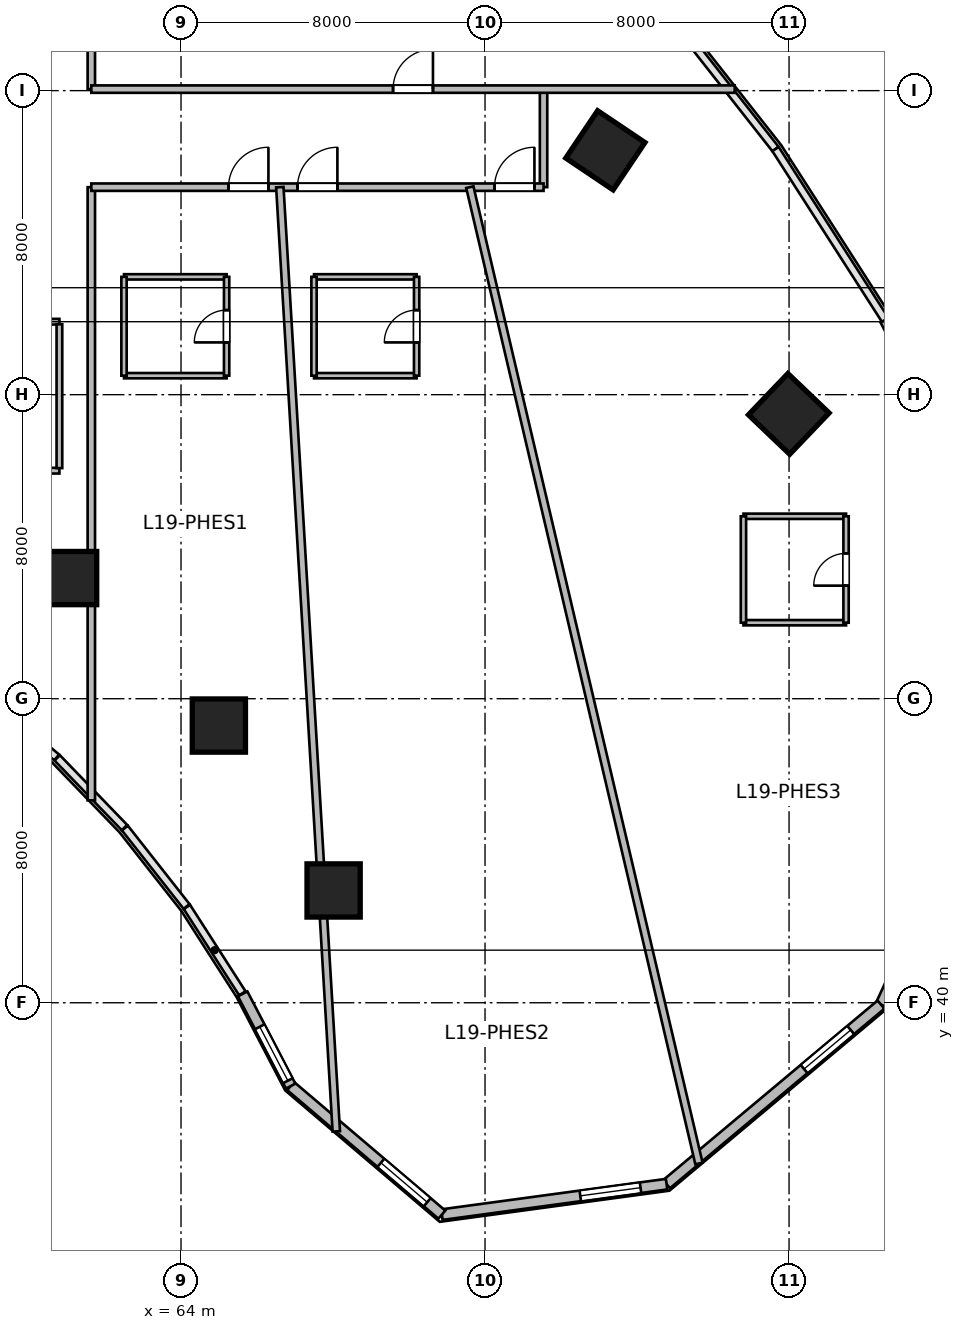
"""IFC4 building model, lengths in metres.
Left out: names, types, materials, properties, quantities, classifications, styles, units other than length and angle.
Written with IfcOpenShell. Run it as: python <this file> out.ifc"""

import sys

from ifc_helpers import new_model, si_unit, direction, frame, frame_2d, origin, origin_2d, place, context, subcontext, project, spatial, rectangle, circle, extrude, source, transform, mapped, element, fill, save


model = new_model("IFC4")
c1 = context("Model", 3, precision=1e-05, world=origin(), true_north=direction((0.0, 1.0)))
c2 = subcontext(c1, "Body", "Model", "MODEL_VIEW")
j1 = project(units=[si_unit("LENGTHUNIT", "METRE"), si_unit("PLANEANGLEUNIT", "RADIAN")], contexts=[c1])
p1 = place(None, origin())
s1 = spatial("IfcSite", under=j1, at=p1, CompositionType="ELEMENT")
p2 = place(p1, origin())
s2 = spatial("IfcBuilding", under=s1, at=p2, CompositionType="ELEMENT")
p3 = place(p2, frame((0.0, 0.0, 82.2)))
s3 = spatial("IfcBuildingStorey", under=s2, at=p3, CompositionType="ELEMENT", Elevation=82.2)
m1 = source(origin(), c2, "Body", "SweptSolid", [
    extrude(circle(Radius=0.7, at=origin_2d()), origin(), (0.0, 0.0, 1.0), 3.6),
])
for number, where, z_axis, x_axis in (
    (1, (61.082, 51.175, 0.0), (0.0, 0.0, 1.0), (0.409, 0.912, 0.0)),
    (2, (64.996, 47.294, 0.0), (0.0, 0.0, 1.0), (0.558, 0.83, 0.0)),
):
    element("IfcColumn", number, at=place(p3, frame(where, z_axis=z_axis, x_axis=x_axis)), inside=s3, PredefinedType="COLUMN", context=c2, shape_type="MappedRepresentation", body=[
        mapped(m1, transform((0.0, 0.0, 0.0), scale=1.0)),
    ])
m2 = source(origin(), c2, "Body", "SweptSolid", [
    extrude(rectangle(XDim=1.5, YDim=1.5, at=origin_2d()), origin(), (0.0, 0.0, 1.0), 3.6),
])
p4 = place(p3, frame((75.167, 62.43, 0.0), z_axis=(0.0, 0.0, 1.0), x_axis=(0.55774510898, 0.830012285095, 0.0)))
e3 = element("IfcColumn", 3, at=p4, inside=s3, PredefinedType="COLUMN", context=c2, shape_type="MappedRepresentation", body=[
    mapped(m2, transform((0.0, 0.0, 0.0), scale=1.0)),
])
p5 = place(p3, frame((68.015, 42.955, 0.0), z_axis=(0.0, 0.0, 1.0), x_axis=(0.690756218984, 0.723087716626, 0.0)))
e4 = element("IfcColumn", 4, at=p5, inside=s3, PredefinedType="COLUMN", context=c2, shape_type="MappedRepresentation", body=[
    mapped(m1, transform((0.0, 0.0, 0.0), scale=1.0)),
])
p6 = place(p3, frame((79.993, 55.494, 0.0), z_axis=(0.0, 0.0, 1.0), x_axis=(0.690756218984, 0.723087716626, 0.0)))
e5 = element("IfcColumn", 5, at=p6, inside=s3, PredefinedType="COLUMN", context=c2, shape_type="MappedRepresentation", body=[
    mapped(m2, transform((0.0, 0.0, 0.0), scale=1.0)),
])
m3 = source(origin(), c2, "Body", "SweptSolid", [
    extrude(rectangle(XDim=7.536, YDim=0.28, at=frame_2d((3.768, 0.0))), origin(), (0.0, 0.0, 1.0), 3.28),
])
p7 = place(p3, frame((85.582, 46.792, 0.0), z_axis=(0.0, 0.0, 1.0), x_axis=(-0.41964973873, -0.907686122393, 0.0)))
e6 = element("IfcWall", 6, at=p7, inside=s3, PredefinedType="SOLIDWALL", context=c2, shape_type="MappedRepresentation", body=[
    mapped(m3, transform((0.0, 0.0, 0.0), scale=1.0)),
])
p8 = place(p7, frame((4.852, 0.0, 0.95)))
e7 = element("IfcOpeningElement", 7, at=p8, cuts=e6, PredefinedType="OPENING", context=c2, shape_type="SweptSolid", body=[
    extrude(rectangle(XDim=1.6, YDim=1.9, at=frame_2d((0.8, 0.95))), frame((0.0, 0.15, 0.0), z_axis=(0.0, -1.0, 0.0), x_axis=(1.0, 0.0, 0.0)), (0.0, 0.0, 1.0), 0.3),
])
m4 = source(origin(), c2, "Body", "SweptSolid", [
    extrude(rectangle(XDim=7.359, YDim=0.28, at=frame_2d((3.679, 0.0))), origin(), (0.0, 0.0, 1.0), 3.28),
])
p9 = place(p3, frame((82.42, 39.951, 0.0), z_axis=(0.0, 0.0, 1.0), x_axis=(-0.766737165543, -0.641961150675, 0.0)))
e8 = element("IfcWall", 8, at=p9, inside=s3, PredefinedType="SOLIDWALL", context=c2, shape_type="MappedRepresentation", body=[
    mapped(m4, transform((0.0, 0.0, 0.0), scale=1.0)),
])
p10 = place(p9, frame((1.04, 0.0, 0.95)))
e9 = element("IfcOpeningElement", 9, at=p10, cuts=e8, PredefinedType="OPENING", context=c2, shape_type="SweptSolid", body=[
    extrude(rectangle(XDim=1.6, YDim=1.9, at=frame_2d((0.8, 0.95))), frame((0.0, 0.15, 0.0), z_axis=(0.0, -1.0, 0.0), x_axis=(1.0, 0.0, 0.0)), (0.0, 0.0, 1.0), 0.3),
])
m5 = source(origin(), c2, "Body", "SweptSolid", [
    extrude(rectangle(XDim=5.967, YDim=0.28, at=frame_2d((2.984, 0.0))), origin(), (0.0, 0.0, 1.0), 3.28),
])
p11 = place(p3, frame((76.777, 35.227, 0.0), z_axis=(0.0, 0.0, 1.0), x_axis=(-0.990927009341, -0.134401124099, 0.0)))
e10 = element("IfcWall", 10, at=p11, inside=s3, PredefinedType="SOLIDWALL", context=c2, shape_type="MappedRepresentation", body=[
    mapped(m5, transform((0.0, 0.0, 0.0), scale=1.0)),
])
p12 = place(p11, frame((0.692, 0.0, 0.95)))
e11 = element("IfcOpeningElement", 11, at=p12, cuts=e10, PredefinedType="OPENING", context=c2, shape_type="SweptSolid", body=[
    extrude(rectangle(XDim=1.6, YDim=1.9, at=frame_2d((0.8, 0.95))), frame((0.0, 0.15, 0.0), z_axis=(0.0, -1.0, 0.0), x_axis=(1.0, 0.0, 0.0)), (0.0, 0.0, 1.0), 0.3),
])
m6 = source(origin(), c2, "Body", "SweptSolid", [
    extrude(rectangle(XDim=5.222, YDim=0.28, at=frame_2d((2.611, 0.0))), origin(), (0.0, 0.0, 1.0), 3.28),
])
p13 = place(p3, frame((70.864, 34.425, 0.0), z_axis=(0.0, 0.0, 1.0), x_axis=(-0.761900099546, 0.647694556339, 0.0)))
e12 = element("IfcWall", 12, at=p13, inside=s3, PredefinedType="SOLIDWALL", context=c2, shape_type="MappedRepresentation", body=[
    mapped(m6, transform((0.0, 0.0, 0.0), scale=1.0)),
])
p14 = place(p13, frame((0.506, 0.0, 0.95)))
e13 = element("IfcOpeningElement", 13, at=p14, cuts=e12, PredefinedType="OPENING", context=c2, shape_type="SweptSolid", body=[
    extrude(rectangle(XDim=1.6, YDim=1.9, at=frame_2d((0.8, 0.95))), frame((0.0, 0.15, 0.0), z_axis=(0.0, -1.0, 0.0), x_axis=(1.0, 0.0, 0.0)), (0.0, 0.0, 1.0), 0.3),
])
m7 = source(origin(), c2, "Body", "SweptSolid", [
    extrude(rectangle(XDim=2.735, YDim=0.28, at=frame_2d((1.368, 0.0))), origin(), (0.0, 0.0, 1.0), 3.28),
])
p15 = place(p3, frame((66.885, 37.807, 0.0), z_axis=(0.0, 0.0, 1.0), x_axis=(-0.46179107292, 0.886988728774, 0.0)))
e14 = element("IfcWall", 14, at=p15, inside=s3, PredefinedType="SOLIDWALL", context=c2, shape_type="MappedRepresentation", body=[
    mapped(m7, transform((0.0, 0.0, 0.0), scale=1.0)),
])
p16 = place(p15, frame((0.16, 0.0, 0.95)))
e15 = element("IfcOpeningElement", 15, at=p16, cuts=e14, PredefinedType="OPENING", context=c2, shape_type="SweptSolid", body=[
    extrude(rectangle(XDim=1.6, YDim=1.9, at=frame_2d((0.8, 0.95))), frame((0.0, 0.15, 0.0), z_axis=(0.0, -1.0, 0.0), x_axis=(1.0, 0.0, 0.0)), (0.0, 0.0, 1.0), 0.3),
])
m8 = source(origin(), c2, "Body", "SweptSolid", [
    extrude(rectangle(XDim=5.459, YDim=0.28, at=frame_2d((2.73, 0.0))), origin(), (0.0, 0.0, 1.0), 3.28),
])
p17 = place(p3, frame((82.532, 57.965, 0.0), z_axis=(0.0, 0.0, 1.0), x_axis=(0.461768054321, -0.887000712518, 0.0)))
e16 = element("IfcWall", 16, at=p17, inside=s3, PredefinedType="SOLIDWALL", context=c2, shape_type="MappedRepresentation", body=[
    mapped(m8, transform((0.0, 0.0, 0.0), scale=1.0)),
])
p18 = place(p17, frame((3.295, 0.0, 0.95)))
e17 = element("IfcOpeningElement", 17, at=p18, cuts=e16, PredefinedType="OPENING", context=c2, shape_type="SweptSolid", body=[
    extrude(rectangle(XDim=1.6, YDim=1.9, at=frame_2d((0.8, 0.95))), frame((0.0, 0.15, 0.0), z_axis=(0.0, -1.0, 0.0), x_axis=(1.0, 0.0, 0.0)), (0.0, 0.0, 1.0), 0.3),
])
m9 = source(origin(), c2, "Body", "SweptSolid", [
    extrude(rectangle(XDim=2.58, YDim=0.195, at=frame_2d((1.29, 0.0))), origin(), (0.0, 0.0, 1.0), 2.847),
])
p19 = place(p3, frame((73.54, 61.46, 0.0), z_axis=(0.0, 0.0, 1.0), x_axis=(0.0, 1.0, 0.0)))
e18 = element("IfcWall", 18, at=p19, inside=s3, PredefinedType="PARTITIONING", context=c2, shape_type="MappedRepresentation", body=[
    mapped(m9, transform((0.0, 0.0, 0.0), scale=1.0)),
])
m10 = source(origin(), c2, "Body", "SweptSolid", [
    extrude(rectangle(XDim=6.6, YDim=0.15, at=frame_2d((3.3, 0.0))), origin(), (0.0, 0.0, 1.0), 2.723),
])
p20 = place(p3, frame((54.2, 54.0, 0.0), z_axis=(0.0, 0.0, 1.0), x_axis=(1.0, 0.0, 0.0)))
e19 = element("IfcWall", 19, at=p20, inside=s3, PredefinedType="PARTITIONING", context=c2, shape_type="MappedRepresentation", body=[
    mapped(m10, transform((0.0, 0.0, 0.0), scale=1.0)),
])
m11 = source(origin(), c2, "Body", "SweptSolid", [
    extrude(rectangle(XDim=6.6, YDim=0.15, at=frame_2d((3.3, 0.0))), origin(), (0.0, 0.0, 1.0), 3.28),
])
p21 = place(p3, frame((54.2, 57.92, 0.0), z_axis=(0.0, 0.0, 1.0), x_axis=(1.0, 0.0, 0.0)))
e20 = element("IfcWall", 20, at=p21, inside=s3, PredefinedType="PARTITIONING", context=c2, shape_type="MappedRepresentation", body=[
    mapped(m11, transform((0.0, 0.0, 0.0), scale=1.0)),
])
p22 = place(p21, frame((2.825, 0.0, 0.0)))
e21 = element("IfcOpeningElement", 21, at=p22, cuts=e20, PredefinedType="OPENING", context=c2, shape_type="SweptSolid", body=[
    extrude(rectangle(XDim=0.95, YDim=2.1, at=frame_2d((0.475, 1.05))), frame((0.0, 0.085, 0.0), z_axis=(0.0, -1.0, 0.0), x_axis=(1.0, 0.0, 0.0)), (0.0, 0.0, 1.0), 0.17),
])
m12 = source(origin(), c2, "Body", "SweptSolid", [
    extrude(rectangle(XDim=3.785, YDim=0.15, at=frame_2d((1.893, 0.0))), origin(), (0.0, 0.0, 1.0), 3.28),
])
p23 = place(p3, frame((60.8, 54.067, 0.0), z_axis=(0.0, 0.0, 1.0), x_axis=(0.0, 1.0, 0.0)))
e22 = element("IfcWall", 22, at=p23, inside=s3, PredefinedType="PARTITIONING", context=c2, shape_type="MappedRepresentation", body=[
    mapped(m12, transform((0.0, 0.0, 0.0), scale=1.0)),
])
m13 = source(origin(), c2, "Body", "SweptSolid", [
    extrude(rectangle(XDim=1.76, YDim=0.195, at=frame_2d((0.88, 0.0))), origin(), (0.0, 0.0, 1.0), 3.28),
])
p24 = place(p3, frame((61.64, 64.04, 0.0), z_axis=(0.0, 0.0, 1.0), x_axis=(0.0, 1.0, 0.0)))
e23 = element("IfcWall", 23, at=p24, inside=s3, PredefinedType="PARTITIONING", context=c2, shape_type="MappedRepresentation", body=[
    mapped(m13, transform((0.0, 0.0, 0.0), scale=1.0)),
])
m14 = source(origin(), c2, "Body", "SweptSolid", [
    extrude(rectangle(XDim=16.134, YDim=0.195, at=frame_2d((8.067, 0.0))), origin(), (0.0, 0.0, 1.0), 2.564),
])
p25 = place(p3, frame((61.64, 45.326, 0.0), z_axis=(0.0, 0.0, 1.0), x_axis=(0.0, 1.0, 0.0)))
e24 = element("IfcWall", 24, at=p25, inside=s3, PredefinedType="PARTITIONING", context=c2, shape_type="MappedRepresentation", body=[
    mapped(m14, transform((0.0, 0.0, 0.0), scale=1.0)),
])
m15 = source(origin(), c2, "Body", "SweptSolid", [
    extrude(rectangle(XDim=16.93, YDim=0.195, at=frame_2d((8.465, 0.0))), origin(), (0.0, 0.0, 1.0), 3.28),
])
p26 = place(p3, frame((61.64, 64.04, 0.0), z_axis=(0.0, 0.0, 1.0), x_axis=(1.0, 0.0, 0.0)))
e25 = element("IfcWall", 25, at=p26, inside=s3, PredefinedType="PARTITIONING", context=c2, shape_type="MappedRepresentation", body=[
    mapped(m15, transform((0.0, 0.0, 0.0), scale=1.0)),
])
p27 = place(p26, frame((7.94, 0.0, 0.0)))
e26 = element("IfcOpeningElement", 26, at=p27, cuts=e25, PredefinedType="OPENING", context=c2, shape_type="SweptSolid", body=[
    extrude(rectangle(XDim=1.05, YDim=2.15, at=frame_2d((0.525, 1.075))), frame((0.0, 0.107, 0.0), z_axis=(0.0, -1.0, 0.0), x_axis=(1.0, 0.0, 0.0)), (0.0, 0.0, 1.0), 0.215),
])
m16 = source(origin(), c2, "Body", "SweptSolid", [
    extrude(rectangle(XDim=11.9, YDim=0.195, at=frame_2d((5.95, 0.0))), origin(), (0.0, 0.0, 1.0), 3.28),
])
p28 = place(p3, frame((61.64, 61.46, 0.0), z_axis=(0.0, 0.0, 1.0), x_axis=(1.0, 0.0, 0.0)))
e27 = element("IfcWall", 27, at=p28, inside=s3, PredefinedType="PARTITIONING", context=c2, shape_type="MappedRepresentation", body=[
    mapped(m16, transform((0.0, 0.0, 0.0), scale=1.0)),
])
p29 = place(p28, frame((3.61, 0.0, 0.0)))
e28 = element("IfcOpeningElement", 28, at=p29, cuts=e27, PredefinedType="OPENING", context=c2, shape_type="SweptSolid", body=[
    extrude(rectangle(XDim=1.05, YDim=2.15, at=frame_2d((0.525, 1.075))), frame((0.0, 0.107, 0.0), z_axis=(0.0, -1.0, 0.0), x_axis=(1.0, 0.0, 0.0)), (0.0, 0.0, 1.0), 0.215),
])
p30 = place(p28, frame((5.425, 0.0, 0.0)))
e29 = element("IfcOpeningElement", 29, at=p30, cuts=e27, PredefinedType="OPENING", context=c2, shape_type="SweptSolid", body=[
    extrude(rectangle(XDim=1.05, YDim=2.15, at=frame_2d((0.525, 1.075))), frame((0.0, 0.107, 0.0), z_axis=(0.0, -1.0, 0.0), x_axis=(1.0, 0.0, 0.0)), (0.0, 0.0, 1.0), 0.215),
])
p31 = place(p28, frame((10.61, 0.0, 0.0)))
e30 = element("IfcOpeningElement", 30, at=p31, cuts=e27, PredefinedType="OPENING", context=c2, shape_type="SweptSolid", body=[
    extrude(rectangle(XDim=1.05, YDim=2.15, at=frame_2d((0.525, 1.075))), frame((0.0, 0.107, 0.0), z_axis=(0.0, -1.0, 0.0), x_axis=(1.0, 0.0, 0.0)), (0.0, 0.0, 1.0), 0.215),
])
m17 = source(origin(), c2, "Body", "SweptSolid", [
    extrude(rectangle(XDim=24.889, YDim=0.195, at=frame_2d((12.444, 0.0))), origin(), (0.0, 0.0, 1.0), 2.564),
])
p32 = place(p3, frame((68.086, 36.616, 0.0), z_axis=(0.0, 0.0, 1.0), x_axis=(-0.059709317989, 0.998215807, 0.0)))
e31 = element("IfcWall", 31, at=p32, inside=s3, PredefinedType="PARTITIONING", context=c2, shape_type="MappedRepresentation", body=[
    mapped(m17, transform((0.0, 0.0, 0.0), scale=1.0)),
])
m18 = source(origin(), c2, "Body", "SweptSolid", [
    extrude(rectangle(XDim=26.387, YDim=0.195, at=frame_2d((13.194, 0.0))), origin(), (0.0, 0.0, 1.0), 2.847),
])
p33 = place(p3, frame((77.629, 35.771, 0.0), z_axis=(0.0, 0.0, 1.0), x_axis=(-0.228490600532, 0.97354611882, 0.0)))
e32 = element("IfcWall", 32, at=p33, inside=s3, PredefinedType="PARTITIONING", context=c2, shape_type="MappedRepresentation", body=[
    mapped(m18, transform((0.0, 0.0, 0.0), scale=1.0)),
])
m19 = source(origin(), c2, "Body", "SweptSolid", [
    extrude(rectangle(XDim=2.7, YDim=0.14, at=frame_2d((1.35, 0.0))), origin(), (0.0, 0.0, 1.0), 3.28),
])
for number, where, z_axis, x_axis in (
    (33, (62.5, 59.1, 0.0), (0.0, 0.0, 1.0), (1.0, 0.0, 0.0)),
    (34, (62.5, 56.5, 0.0), (0.0, 0.0, 1.0), (1.0, 0.0, 0.0)),
):
    element("IfcWall", number, at=place(p3, frame(where, z_axis=z_axis, x_axis=x_axis)), inside=s3, PredefinedType="PARTITIONING", context=c2, shape_type="MappedRepresentation", body=[
        mapped(m19, transform((0.0, 0.0, 0.0), scale=1.0)),
    ])
m20 = source(origin(), c2, "Body", "SweptSolid", [
    extrude(rectangle(XDim=2.6, YDim=0.14, at=frame_2d((1.3, 0.0))), origin(), (0.0, 0.0, 1.0), 3.28),
])
p34 = place(p3, frame((62.5, 56.5, 0.0), z_axis=(0.0, 0.0, 1.0), x_axis=(0.0, 1.0, 0.0)))
e35 = element("IfcWall", 35, at=p34, inside=s3, PredefinedType="PARTITIONING", context=c2, shape_type="MappedRepresentation", body=[
    mapped(m20, transform((0.0, 0.0, 0.0), scale=1.0)),
])
p35 = place(p3, frame((65.2, 56.5, 0.0), z_axis=(0.0, 0.0, 1.0), x_axis=(0.0, 1.0, 0.0)))
e36 = element("IfcWall", 36, at=p35, inside=s3, PredefinedType="PARTITIONING", context=c2, shape_type="MappedRepresentation", body=[
    mapped(m20, transform((0.0, 0.0, 0.0), scale=1.0)),
])
p36 = place(p35, frame((0.875, 0.0, 0.0)))
e37 = element("IfcOpeningElement", 37, at=p36, cuts=e36, PredefinedType="OPENING", context=c2, shape_type="SweptSolid", body=[
    extrude(rectangle(XDim=0.85, YDim=2.05, at=frame_2d((0.425, 1.025))), frame((0.0, 0.08, 0.0), z_axis=(0.0, -1.0, 0.0), x_axis=(1.0, 0.0, 0.0)), (0.0, 0.0, 1.0), 0.16),
])
for number, where, z_axis, x_axis in (
    (38, (67.5, 59.1, 0.0), (0.0, 0.0, 1.0), (1.0, 0.0, 0.0)),
    (39, (67.5, 56.5, 0.0), (0.0, 0.0, 1.0), (1.0, 0.0, 0.0)),
):
    element("IfcWall", number, at=place(p3, frame(where, z_axis=z_axis, x_axis=x_axis)), inside=s3, PredefinedType="PARTITIONING", context=c2, shape_type="MappedRepresentation", body=[
        mapped(m19, transform((0.0, 0.0, 0.0), scale=1.0)),
    ])
m21 = source(origin(), c2, "Body", "SweptSolid", [
    extrude(rectangle(XDim=2.6, YDim=0.14, at=frame_2d((1.3, 0.0))), origin(), (0.0, 0.0, 1.0), 2.649),
])
p37 = place(p3, frame((67.5, 56.5, 0.0), z_axis=(0.0, 0.0, 1.0), x_axis=(0.0, 1.0, 0.0)))
e40 = element("IfcWall", 40, at=p37, inside=s3, PredefinedType="PARTITIONING", context=c2, shape_type="MappedRepresentation", body=[
    mapped(m21, transform((0.0, 0.0, 0.0), scale=1.0)),
])
m22 = source(origin(), c2, "Body", "SweptSolid", [
    extrude(rectangle(XDim=2.6, YDim=0.14, at=frame_2d((1.3, 0.0))), origin(), (0.0, 0.0, 1.0), 2.847),
])
p38 = place(p3, frame((70.2, 56.5, 0.0), z_axis=(0.0, 0.0, 1.0), x_axis=(0.0, 1.0, 0.0)))
e41 = element("IfcWall", 41, at=p38, inside=s3, PredefinedType="PARTITIONING", context=c2, shape_type="MappedRepresentation", body=[
    mapped(m22, transform((0.0, 0.0, 0.0), scale=1.0)),
])
p39 = place(p38, frame((0.875, 0.0, 0.0)))
e42 = element("IfcOpeningElement", 42, at=p39, cuts=e41, PredefinedType="OPENING", context=c2, shape_type="SweptSolid", body=[
    extrude(rectangle(XDim=0.85, YDim=2.05, at=frame_2d((0.425, 1.025))), frame((0.0, 0.08, 0.0), z_axis=(0.0, -1.0, 0.0), x_axis=(1.0, 0.0, 0.0)), (0.0, 0.0, 1.0), 0.16),
])
for number, where, z_axis, x_axis in (
    (43, (78.8, 52.8, 0.0), (0.0, 0.0, 1.0), (1.0, 0.0, 0.0)),
    (44, (78.8, 50.0, 0.0), (0.0, 0.0, 1.0), (1.0, 0.0, 0.0)),
):
    element("IfcWall", number, at=place(p3, frame(where, z_axis=z_axis, x_axis=x_axis)), inside=s3, PredefinedType="PARTITIONING", context=c2, shape_type="MappedRepresentation", body=[
        mapped(m19, transform((0.0, 0.0, 0.0), scale=1.0)),
    ])
m23 = source(origin(), c2, "Body", "SweptSolid", [
    extrude(rectangle(XDim=2.8, YDim=0.14, at=frame_2d((1.4, 0.0))), origin(), (0.0, 0.0, 1.0), 3.28),
])
p40 = place(p3, frame((78.8, 50.0, 0.0), z_axis=(0.0, 0.0, 1.0), x_axis=(0.0, 1.0, 0.0)))
e45 = element("IfcWall", 45, at=p40, inside=s3, PredefinedType="PARTITIONING", context=c2, shape_type="MappedRepresentation", body=[
    mapped(m23, transform((0.0, 0.0, 0.0), scale=1.0)),
])
p41 = place(p3, frame((81.5, 50.0, 0.0), z_axis=(0.0, 0.0, 1.0), x_axis=(0.0, 1.0, 0.0)))
e46 = element("IfcWall", 46, at=p41, inside=s3, PredefinedType="PARTITIONING", context=c2, shape_type="MappedRepresentation", body=[
    mapped(m23, transform((0.0, 0.0, 0.0), scale=1.0)),
])
p42 = place(p41, frame((0.975, 0.0, 0.0)))
e47 = element("IfcOpeningElement", 47, at=p42, cuts=e46, PredefinedType="OPENING", context=c2, shape_type="SweptSolid", body=[
    extrude(rectangle(XDim=0.85, YDim=2.05, at=frame_2d((0.425, 1.025))), frame((0.0, 0.08, 0.0), z_axis=(0.0, -1.0, 0.0), x_axis=(1.0, 0.0, 0.0)), (0.0, 0.0, 1.0), 0.16),
])
m24 = source(origin(), c2, "Body", "SweptSolid", [
    extrude(rectangle(XDim=1.6, YDim=1.9, at=frame_2d((0.8, 0.95))), frame((0.0, 0.03, 0.0), z_axis=(0.0, -1.0, 0.0), x_axis=(1.0, 0.0, 0.0)), (0.0, 0.0, 1.0), 0.06),
])
p43 = place(p10, origin())
e48 = element("IfcWindow", 48, at=p43, inside=s3, PartitioningType="SINGLE_PANEL", PredefinedType="WINDOW", context=c2, shape_type="MappedRepresentation", body=[
    mapped(m24, transform((0.0, 0.0, 0.0), scale=1.0)),
])
fill(e9, e48)
p44 = place(p12, origin())
e49 = element("IfcWindow", 49, at=p44, inside=s3, PartitioningType="SINGLE_PANEL", PredefinedType="WINDOW", context=c2, shape_type="MappedRepresentation", body=[
    mapped(m24, transform((0.0, 0.0, 0.0), scale=1.0)),
])
fill(e11, e49)
p45 = place(p14, origin())
e50 = element("IfcWindow", 50, at=p45, inside=s3, PartitioningType="SINGLE_PANEL", PredefinedType="WINDOW", context=c2, shape_type="MappedRepresentation", body=[
    mapped(m24, transform((0.0, 0.0, 0.0), scale=1.0)),
])
fill(e13, e50)
p46 = place(p16, origin())
e51 = element("IfcWindow", 51, at=p46, inside=s3, PartitioningType="SINGLE_PANEL", PredefinedType="WINDOW", context=c2, shape_type="MappedRepresentation", body=[
    mapped(m24, transform((0.0, 0.0, 0.0), scale=1.0)),
])
fill(e15, e51)
m25 = source(origin(), c2, "Body", "SweptSolid", [
    extrude(rectangle(XDim=1.05, YDim=2.15, at=frame_2d((0.525, 1.075))), frame((0.0, 0.025, 0.0), z_axis=(0.0, -1.0, 0.0), x_axis=(1.0, 0.0, 0.0)), (0.0, 0.0, 1.0), 0.05),
])
p47 = place(p27, origin())
e52 = element("IfcDoor", 52, at=p47, inside=s3, OperationType="SINGLE_SWING_RIGHT", PredefinedType="DOOR", context=c2, shape_type="MappedRepresentation", body=[
    mapped(m25, transform((0.0, 0.0, 0.0), scale=1.0)),
])
fill(e26, e52)
p48 = place(p29, origin())
e53 = element("IfcDoor", 53, at=p48, inside=s3, OperationType="SINGLE_SWING_RIGHT", PredefinedType="DOOR", context=c2, shape_type="MappedRepresentation", body=[
    mapped(m25, transform((0.0, 0.0, 0.0), scale=1.0)),
])
fill(e28, e53)
m26 = source(origin(), c2, "Body", "SweptSolid", [
    extrude(rectangle(XDim=0.85, YDim=2.05, at=frame_2d((0.425, 1.025))), frame((0.0, 0.025, 0.0), z_axis=(0.0, -1.0, 0.0), x_axis=(1.0, 0.0, 0.0)), (0.0, 0.0, 1.0), 0.05),
])
p49 = place(p36, origin())
e54 = element("IfcDoor", 54, at=p49, inside=s3, OperationType="SINGLE_SWING_LEFT", PredefinedType="DOOR", context=c2, shape_type="MappedRepresentation", body=[
    mapped(m26, transform((0.0, 0.0, 0.0), scale=1.0)),
])
fill(e37, e54)
p50 = place(p30, origin())
e55 = element("IfcDoor", 55, at=p50, inside=s3, OperationType="SINGLE_SWING_RIGHT", PredefinedType="DOOR", context=c2, shape_type="MappedRepresentation", body=[
    mapped(m25, transform((0.0, 0.0, 0.0), scale=1.0)),
])
fill(e29, e55)
p51 = place(p39, origin())
e56 = element("IfcDoor", 56, at=p51, inside=s3, OperationType="SINGLE_SWING_LEFT", PredefinedType="DOOR", context=c2, shape_type="MappedRepresentation", body=[
    mapped(m26, transform((0.0, 0.0, 0.0), scale=1.0)),
])
fill(e42, e56)
p52 = place(p31, origin())
e57 = element("IfcDoor", 57, at=p52, inside=s3, OperationType="SINGLE_SWING_RIGHT", PredefinedType="DOOR", context=c2, shape_type="MappedRepresentation", body=[
    mapped(m25, transform((0.0, 0.0, 0.0), scale=1.0)),
])
fill(e30, e57)
p53 = place(p42, origin())
e58 = element("IfcDoor", 58, at=p53, inside=s3, OperationType="SINGLE_SWING_LEFT", PredefinedType="DOOR", context=c2, shape_type="MappedRepresentation", body=[
    mapped(m26, transform((0.0, 0.0, 0.0), scale=1.0)),
])
fill(e47, e58)
save(model, sys.argv[1])
